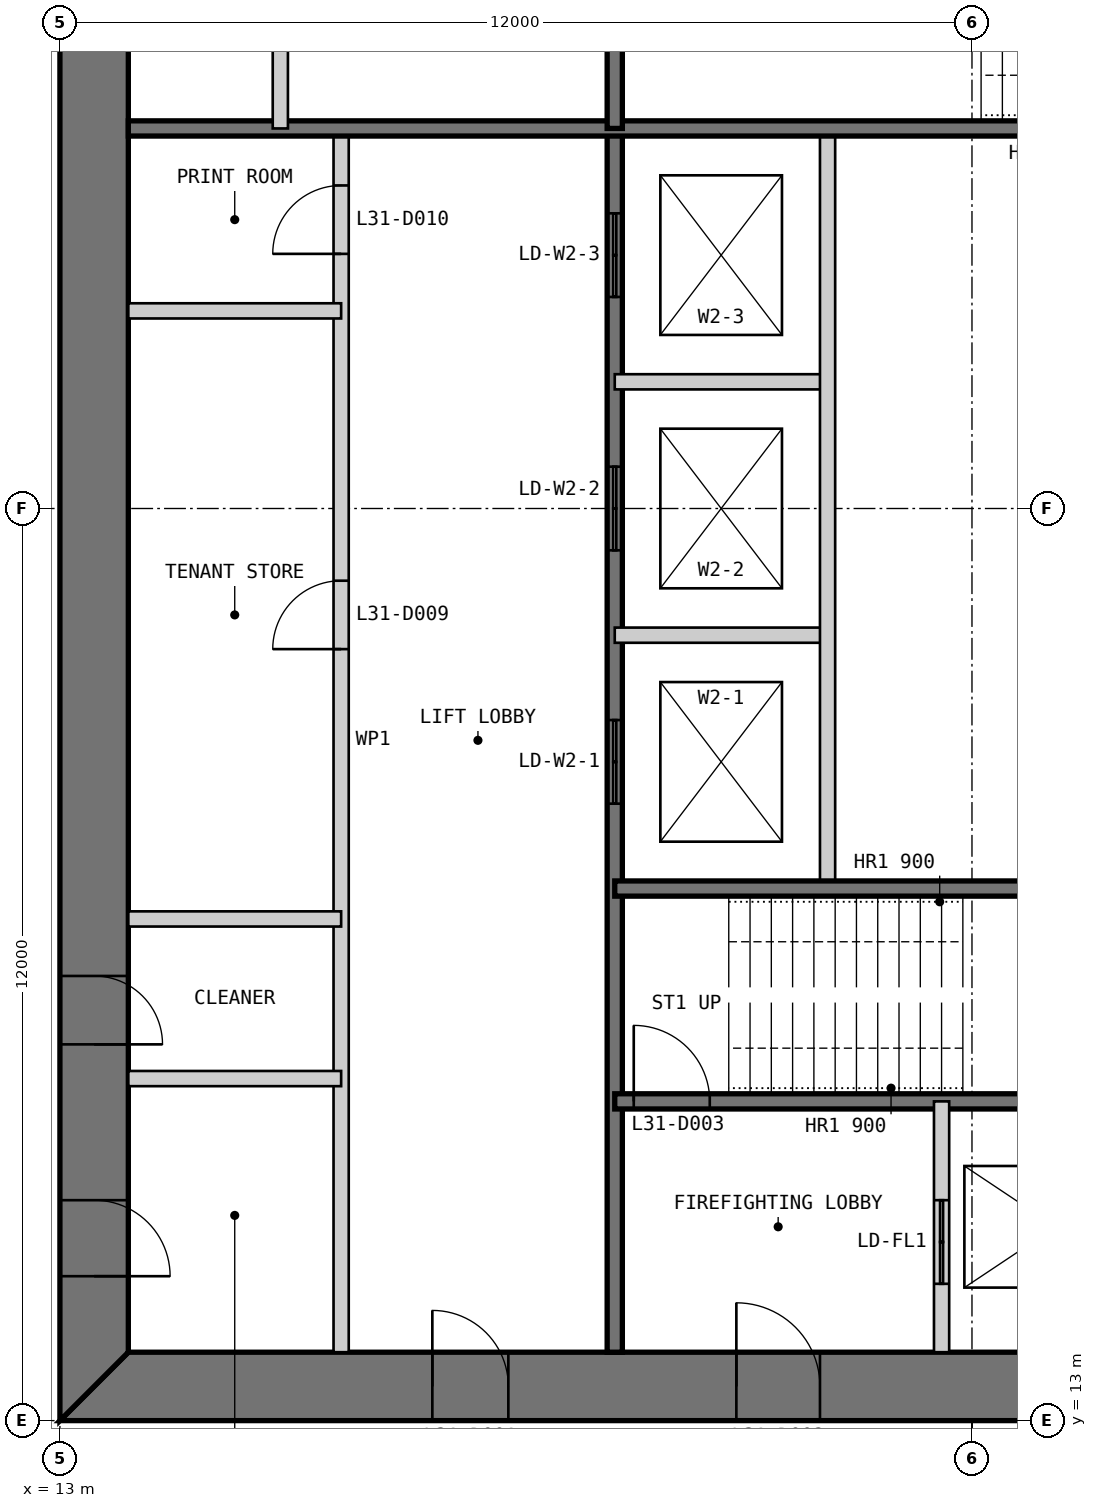
"""IFC4 building model, lengths in metres.
Left out: names, types, materials, properties, quantities, classifications, styles, units other than length and angle.
Written with IfcOpenShell. Run it as: python <this file> out.ifc"""

import sys

from ifc_helpers import new_model, si_unit, direction, frame, frame_2d, origin, place, context, subcontext, project, spatial, polyline, rectangle, outline, extrude, element, fill, save


model = new_model("IFC4")
c1 = context("Model", 3, precision=1e-05, world=origin(), true_north=direction((0.0, 1.0)))
c2 = subcontext(c1, "Body", "Model", "MODEL_VIEW")
j1 = project(units=[si_unit("LENGTHUNIT", "METRE"), si_unit("PLANEANGLEUNIT", "RADIAN")], contexts=[c1])
p1 = place(None, origin())
s1 = spatial("IfcSite", under=j1, at=p1, CompositionType="ELEMENT")
p2 = place(p1, origin())
s2 = spatial("IfcBuilding", under=s1, at=p2, CompositionType="ELEMENT")
p3 = place(p2, frame((0.0, 0.0, 134.4)))
s3 = spatial("IfcBuildingStorey", under=s2, at=p3, CompositionType="ELEMENT", Elevation=134.4)
p4 = place(p3, frame((13.0, 13.45, 0.0), z_axis=(0.0, 0.0, 1.0), x_axis=(1.0, 0.0, 0.0)))
e1 = element("IfcWall", 1, at=p4, inside=s3, PredefinedType="SHEAR", context=c2, shape_type="SweptSolid", body=[
    extrude(outline(polyline([(0.0, -0.45), (24.0, -0.45), (23.1, 0.45), (0.9, 0.45), (0.0, -0.45)])), origin(), (0.0, 0.0, 1.0), 4.0),
])
p5 = place(p4, frame((4.9, 0.0, 0.0)))
e2 = element("IfcOpeningElement", 2, at=p5, cuts=e1, PredefinedType="OPENING", context=c2, shape_type="SweptSolid", body=[
    extrude(rectangle(XDim=1.0, YDim=2.2, at=frame_2d((0.5, 1.1))), frame((0.0, 0.46, 0.0), z_axis=(0.0, -1.0, 0.0), x_axis=(1.0, 0.0, 0.0)), (0.0, 0.0, 1.0), 0.92),
])
p6 = place(p4, frame((8.9, 0.0, 0.0)))
e3 = element("IfcOpeningElement", 3, at=p6, cuts=e1, PredefinedType="OPENING", context=c2, shape_type="SweptSolid", body=[
    extrude(rectangle(XDim=1.1, YDim=2.2, at=frame_2d((0.55, 1.1))), frame((0.0, 0.46, 0.0), z_axis=(0.0, -1.0, 0.0), x_axis=(1.0, 0.0, 0.0)), (0.0, 0.0, 1.0), 0.92),
])
p7 = place(p4, frame((15.05, 0.0, 0.0)))
e4 = element("IfcOpeningElement", 4, at=p7, cuts=e1, PredefinedType="OPENING", context=c2, shape_type="SweptSolid", body=[
    extrude(rectangle(XDim=0.9, YDim=2.2, at=frame_2d((0.45, 1.1))), frame((0.0, 0.46, 0.0), z_axis=(0.0, -1.0, 0.0), x_axis=(1.0, 0.0, 0.0)), (0.0, 0.0, 1.0), 0.92),
])
p8 = place(p4, frame((17.9, 0.0, 0.0)))
e5 = element("IfcOpeningElement", 5, at=p8, cuts=e1, PredefinedType="OPENING", context=c2, shape_type="SweptSolid", body=[
    extrude(rectangle(XDim=1.0, YDim=2.2, at=frame_2d((0.5, 1.1))), frame((0.0, 0.46, 0.0), z_axis=(0.0, -1.0, 0.0), x_axis=(1.0, 0.0, 0.0)), (0.0, 0.0, 1.0), 0.92),
])
p9 = place(p4, frame((21.4, 0.0, 0.0)))
e6 = element("IfcOpeningElement", 6, at=p9, cuts=e1, PredefinedType="OPENING", context=c2, shape_type="SweptSolid", body=[
    extrude(rectangle(XDim=1.0, YDim=2.2, at=frame_2d((0.5, 1.1))), frame((0.0, 0.46, 0.0), z_axis=(0.0, -1.0, 0.0), x_axis=(1.0, 0.0, 0.0)), (0.0, 0.0, 1.0), 0.92),
])
p10 = place(p3, frame((13.45, 36.1, 0.0), z_axis=(0.0, 0.0, 1.0), x_axis=(0.0, -1.0, 0.0)))
e7 = element("IfcWall", 7, at=p10, inside=s3, PredefinedType="SHEAR", context=c2, shape_type="SweptSolid", body=[
    extrude(outline(polyline([(-0.9, -0.45), (23.1, -0.45), (22.2, 0.45), (0.0, 0.45), (-0.9, -0.45)])), origin(), (0.0, 0.0, 1.0), 4.0),
])
p11 = place(p10, frame((20.2, 0.0, 0.0)))
e8 = element("IfcOpeningElement", 8, at=p11, cuts=e7, PredefinedType="OPENING", context=c2, shape_type="SweptSolid", body=[
    extrude(rectangle(XDim=1.0, YDim=2.2, at=frame_2d((0.5, 1.1))), frame((0.0, 0.46, 0.0), z_axis=(0.0, -1.0, 0.0), x_axis=(1.0, 0.0, 0.0)), (0.0, 0.0, 1.0), 0.92),
])
p12 = place(p10, frame((17.25, 0.0, 0.0)))
e9 = element("IfcOpeningElement", 9, at=p12, cuts=e7, PredefinedType="OPENING", context=c2, shape_type="SweptSolid", body=[
    extrude(rectangle(XDim=0.9, YDim=2.2, at=frame_2d((0.45, 1.1))), frame((0.0, 0.46, 0.0), z_axis=(0.0, -1.0, 0.0), x_axis=(1.0, 0.0, 0.0)), (0.0, 0.0, 1.0), 0.92),
])
p13 = place(p3, frame((16.7, 13.9, 0.0), z_axis=(0.0, 0.0, 1.0), x_axis=(0.0, 1.0, 0.0)))
e10 = element("IfcWall", 10, at=p13, inside=s3, PredefinedType="PARTITIONING", context=c2, shape_type="SweptSolid", body=[
    extrude(rectangle(XDim=16.1, YDim=0.2, at=frame_2d((8.05, 0.0))), origin(), (0.0, 0.0, 1.0), 3.8),
])
p14 = place(p13, frame((9.25, 0.0, 0.0)))
e11 = element("IfcOpeningElement", 11, at=p14, cuts=e10, PredefinedType="OPENING", context=c2, shape_type="SweptSolid", body=[
    extrude(rectangle(XDim=0.9, YDim=2.2, at=frame_2d((0.45, 1.1))), frame((0.0, 0.11, 0.0), z_axis=(0.0, -1.0, 0.0), x_axis=(1.0, 0.0, 0.0)), (0.0, 0.0, 1.0), 0.22),
])
p15 = place(p13, frame((14.45, 0.0, 0.0)))
e12 = element("IfcOpeningElement", 12, at=p15, cuts=e10, PredefinedType="OPENING", context=c2, shape_type="SweptSolid", body=[
    extrude(rectangle(XDim=0.9, YDim=2.2, at=frame_2d((0.45, 1.1))), frame((0.0, 0.11, 0.0), z_axis=(0.0, -1.0, 0.0), x_axis=(1.0, 0.0, 0.0)), (0.0, 0.0, 1.0), 0.22),
])
p16 = place(p3, frame((20.3, 13.9, 0.0), z_axis=(0.0, 0.0, 1.0), x_axis=(0.0, 1.0, 0.0)))
e13 = element("IfcWall", 13, at=p16, inside=s3, PredefinedType="SOLIDWALL", context=c2, shape_type="SweptSolid", body=[
    extrude(rectangle(XDim=16.1, YDim=0.2, at=frame_2d((8.05, 0.0))), origin(), (0.0, 0.0, 1.0), 3.8),
])
p17 = place(p16, frame((7.217, 0.0, 0.0)))
e14 = element("IfcOpeningElement", 14, at=p17, cuts=e13, PredefinedType="OPENING", context=c2, shape_type="SweptSolid", body=[
    extrude(rectangle(XDim=1.1, YDim=2.2, at=frame_2d((0.55, 1.1))), frame((0.0, 0.11, 0.0), z_axis=(0.0, -1.0, 0.0), x_axis=(1.0, 0.0, 0.0)), (0.0, 0.0, 1.0), 0.22),
])
p18 = place(p16, frame((10.55, 0.0, 0.0)))
e15 = element("IfcOpeningElement", 15, at=p18, cuts=e13, PredefinedType="OPENING", context=c2, shape_type="SweptSolid", body=[
    extrude(rectangle(XDim=1.1, YDim=2.2, at=frame_2d((0.55, 1.1))), frame((0.0, 0.11, 0.0), z_axis=(0.0, -1.0, 0.0), x_axis=(1.0, 0.0, 0.0)), (0.0, 0.0, 1.0), 0.22),
])
p19 = place(p16, frame((13.883, 0.0, 0.0)))
e16 = element("IfcOpeningElement", 16, at=p19, cuts=e13, PredefinedType="OPENING", context=c2, shape_type="SweptSolid", body=[
    extrude(rectangle(XDim=1.1, YDim=2.2, at=frame_2d((0.55, 1.1))), frame((0.0, 0.11, 0.0), z_axis=(0.0, -1.0, 0.0), x_axis=(1.0, 0.0, 0.0)), (0.0, 0.0, 1.0), 0.22),
])
for number, where, z_axis, x_axis in (
    (17, (20.3, 23.333, 0.0), (0.0, 0.0, 1.0), (1.0, 0.0, 0.0)),
    (18, (20.3, 26.667, 0.0), (0.0, 0.0, 1.0), (1.0, 0.0, 0.0)),
):
    element("IfcWall", number, at=place(p3, frame(where, z_axis=z_axis, x_axis=x_axis)), inside=s3, PredefinedType="PARTITIONING", context=c2, shape_type="SweptSolid", body=[
        extrude(rectangle(XDim=2.8, YDim=0.2, at=frame_2d((1.4, 0.0))), origin(), (0.0, 0.0, 1.0), 3.8),
    ])
p20 = place(p3, frame((23.1, 20.0, 0.0), z_axis=(0.0, 0.0, 1.0), x_axis=(0.0, 1.0, 0.0)))
e19 = element("IfcWall", 19, at=p20, inside=s3, PredefinedType="PARTITIONING", context=c2, shape_type="SweptSolid", body=[
    extrude(rectangle(XDim=10.0, YDim=0.2, at=frame_2d((5.0, 0.0))), origin(), (0.0, 0.0, 1.0), 3.8),
])
p21 = place(p3, frame((20.3, 17.2, 0.0), z_axis=(0.0, 0.0, 1.0), x_axis=(1.0, 0.0, 0.0)))
e20 = element("IfcWall", 20, at=p21, inside=s3, PredefinedType="SOLIDWALL", context=c2, shape_type="SweptSolid", body=[
    extrude(rectangle(XDim=9.4, YDim=0.2, at=frame_2d((4.7, 0.0))), origin(), (0.0, 0.0, 1.0), 3.8),
])
p22 = place(p21, frame((0.25, 0.0, 0.0)))
e21 = element("IfcOpeningElement", 21, at=p22, cuts=e20, PredefinedType="OPENING", context=c2, shape_type="SweptSolid", body=[
    extrude(rectangle(XDim=1.0, YDim=2.2, at=frame_2d((0.5, 1.1))), frame((0.0, 0.11, 0.0), z_axis=(0.0, -1.0, 0.0), x_axis=(1.0, 0.0, 0.0)), (0.0, 0.0, 1.0), 0.22),
])
p23 = place(p3, frame((20.3, 20.0, 0.0), z_axis=(0.0, 0.0, 1.0), x_axis=(1.0, 0.0, 0.0)))
e22 = element("IfcWall", 22, at=p23, inside=s3, PredefinedType="SOLIDWALL", context=c2, shape_type="SweptSolid", body=[
    extrude(rectangle(XDim=15.8, YDim=0.2, at=frame_2d((7.9, 0.0))), origin(), (0.0, 0.0, 1.0), 3.8),
])
p24 = place(p3, frame((24.6, 13.9, 0.0), z_axis=(0.0, 0.0, 1.0), x_axis=(0.0, 1.0, 0.0)))
e23 = element("IfcWall", 23, at=p24, inside=s3, PredefinedType="PARTITIONING", context=c2, shape_type="SweptSolid", body=[
    extrude(rectangle(XDim=3.3, YDim=0.2, at=frame_2d((1.65, 0.0))), origin(), (0.0, 0.0, 1.0), 3.8),
])
p25 = place(p24, frame((0.9, 0.0, 0.0)))
e24 = element("IfcOpeningElement", 24, at=p25, cuts=e23, PredefinedType="OPENING", context=c2, shape_type="SweptSolid", body=[
    extrude(rectangle(XDim=1.1, YDim=2.2, at=frame_2d((0.55, 1.1))), frame((0.0, 0.11, 0.0), z_axis=(0.0, -1.0, 0.0), x_axis=(1.0, 0.0, 0.0)), (0.0, 0.0, 1.0), 0.22),
])
for number, where, z_axis, x_axis in (
    (25, (13.9, 17.5, 0.0), (0.0, 0.0, 1.0), (1.0, 0.0, 0.0)),
    (26, (13.9, 19.6, 0.0), (0.0, 0.0, 1.0), (1.0, 0.0, 0.0)),
    (27, (13.9, 27.6, 0.0), (0.0, 0.0, 1.0), (1.0, 0.0, 0.0)),
):
    element("IfcWall", number, at=place(p3, frame(where, z_axis=z_axis, x_axis=x_axis)), inside=s3, PredefinedType="PARTITIONING", context=c2, shape_type="SweptSolid", body=[
        extrude(rectangle(XDim=2.8, YDim=0.2, at=frame_2d((1.4, 0.0))), origin(), (0.0, 0.0, 1.0), 3.8),
    ])
p26 = place(p3, frame((29.7, 30.0, 0.0), z_axis=(0.0, 0.0, 1.0), x_axis=(-1.0, 0.0, 0.0)))
e28 = element("IfcWall", 28, at=p26, inside=s3, PredefinedType="SOLIDWALL", context=c2, shape_type="SweptSolid", body=[
    extrude(rectangle(XDim=15.8, YDim=0.2, at=frame_2d((7.9, 0.0))), origin(), (0.0, 0.0, 1.0), 3.8),
])
p27 = place(p3, frame((20.3, 36.1, 0.0), z_axis=(0.0, 0.0, 1.0), x_axis=(0.0, -1.0, 0.0)))
e29 = element("IfcWall", 29, at=p27, inside=s3, PredefinedType="SOLIDWALL", context=c2, shape_type="SweptSolid", body=[
    extrude(rectangle(XDim=6.1, YDim=0.2, at=frame_2d((3.05, 0.0))), origin(), (0.0, 0.0, 1.0), 3.8),
])
p28 = place(p3, frame((15.9, 36.1, 0.0), z_axis=(0.0, 0.0, 1.0), x_axis=(0.0, -1.0, 0.0)))
e30 = element("IfcWall", 30, at=p28, inside=s3, PredefinedType="PARTITIONING", context=c2, shape_type="SweptSolid", body=[
    extrude(rectangle(XDim=6.1, YDim=0.2, at=frame_2d((3.05, 0.0))), origin(), (0.0, 0.0, 1.0), 3.8),
])
p29 = place(p5, origin())
e31 = element("IfcDoor", 31, at=p29, inside=s3, OperationType="SINGLE_SWING_LEFT", PredefinedType="DOOR", context=c2, shape_type="SweptSolid", body=[
    extrude(rectangle(XDim=1.0, YDim=2.2, at=frame_2d((0.5, 1.1))), frame((0.0, 0.025, 0.0), z_axis=(0.0, -1.0, 0.0), x_axis=(1.0, 0.0, 0.0)), (0.0, 0.0, 1.0), 0.05),
    extrude(outline(polyline([(0.0, 0.0), (0.04, 0.0), (0.04, 2.16), (0.96, 2.16), (0.96, 0.0), (1.0, 0.0), (1.0, 2.2), (0.0, 2.2), (0.0, 0.0)])), frame((0.0, 0.3, 0.0), z_axis=(0.0, -1.0, 0.0), x_axis=(1.0, 0.0, 0.0)), (0.0, 0.0, 1.0), 0.6),
])
fill(e2, e31)
p30 = place(p6, origin())
e32 = element("IfcDoor", 32, at=p30, inside=s3, OperationType="SINGLE_SWING_LEFT", PredefinedType="DOOR", context=c2, shape_type="SweptSolid", body=[
    extrude(rectangle(XDim=1.1, YDim=2.2, at=frame_2d((0.55, 1.1))), frame((0.0, 0.025, 0.0), z_axis=(0.0, -1.0, 0.0), x_axis=(1.0, 0.0, 0.0)), (0.0, 0.0, 1.0), 0.05),
    extrude(outline(polyline([(0.0, 0.0), (0.04, 0.0), (0.04, 2.16), (1.06, 2.16), (1.06, 0.0), (1.1, 0.0), (1.1, 2.2), (0.0, 2.2), (0.0, 0.0)])), frame((0.0, 0.3, 0.0), z_axis=(0.0, -1.0, 0.0), x_axis=(1.0, 0.0, 0.0)), (0.0, 0.0, 1.0), 0.6),
])
fill(e3, e32)
p31 = place(p22, origin())
e33 = element("IfcDoor", 33, at=p31, inside=s3, OperationType="SINGLE_SWING_LEFT", PredefinedType="DOOR", context=c2, shape_type="SweptSolid", body=[
    extrude(rectangle(XDim=1.0, YDim=2.2, at=frame_2d((0.5, 1.1))), frame((0.0, 0.025, 0.0), z_axis=(0.0, -1.0, 0.0), x_axis=(1.0, 0.0, 0.0)), (0.0, 0.0, 1.0), 0.05),
])
fill(e21, e33)
p32 = place(p11, origin())
e34 = element("IfcDoor", 34, at=p32, inside=s3, OperationType="SINGLE_SWING_RIGHT", PredefinedType="DOOR", context=c2, shape_type="SweptSolid", body=[
    extrude(rectangle(XDim=1.0, YDim=2.2, at=frame_2d((0.5, 1.1))), frame((0.0, 0.025, 0.0), z_axis=(0.0, -1.0, 0.0), x_axis=(1.0, 0.0, 0.0)), (0.0, 0.0, 1.0), 0.05),
    extrude(outline(polyline([(0.0, 0.0), (0.04, 0.0), (0.04, 2.16), (0.96, 2.16), (0.96, 0.0), (1.0, 0.0), (1.0, 2.2), (0.0, 2.2), (0.0, 0.0)])), frame((0.0, 0.3, 0.0), z_axis=(0.0, -1.0, 0.0), x_axis=(1.0, 0.0, 0.0)), (0.0, 0.0, 1.0), 0.6),
])
fill(e8, e34)
p33 = place(p12, origin())
e35 = element("IfcDoor", 35, at=p33, inside=s3, OperationType="SINGLE_SWING_RIGHT", PredefinedType="DOOR", context=c2, shape_type="SweptSolid", body=[
    extrude(rectangle(XDim=0.9, YDim=2.2, at=frame_2d((0.45, 1.1))), frame((0.0, 0.025, 0.0), z_axis=(0.0, -1.0, 0.0), x_axis=(1.0, 0.0, 0.0)), (0.0, 0.0, 1.0), 0.05),
    extrude(outline(polyline([(0.0, 0.0), (0.04, 0.0), (0.04, 2.16), (0.86, 2.16), (0.86, 0.0), (0.9, 0.0), (0.9, 2.2), (0.0, 2.2), (0.0, 0.0)])), frame((0.0, 0.3, 0.0), z_axis=(0.0, -1.0, 0.0), x_axis=(1.0, 0.0, 0.0)), (0.0, 0.0, 1.0), 0.6),
])
fill(e9, e35)
p34 = place(p14, origin())
e36 = element("IfcDoor", 36, at=p34, inside=s3, OperationType="SINGLE_SWING_LEFT", PredefinedType="DOOR", context=c2, shape_type="SweptSolid", body=[
    extrude(rectangle(XDim=0.9, YDim=2.2, at=frame_2d((0.45, 1.1))), frame((0.0, 0.025, 0.0), z_axis=(0.0, -1.0, 0.0), x_axis=(1.0, 0.0, 0.0)), (0.0, 0.0, 1.0), 0.05),
])
fill(e11, e36)
p35 = place(p15, origin())
e37 = element("IfcDoor", 37, at=p35, inside=s3, OperationType="SINGLE_SWING_LEFT", PredefinedType="DOOR", context=c2, shape_type="SweptSolid", body=[
    extrude(rectangle(XDim=0.9, YDim=2.2, at=frame_2d((0.45, 1.1))), frame((0.0, 0.025, 0.0), z_axis=(0.0, -1.0, 0.0), x_axis=(1.0, 0.0, 0.0)), (0.0, 0.0, 1.0), 0.05),
])
fill(e12, e37)
p36 = place(p25, origin())
e38 = element("IfcDoor", 38, at=p36, inside=s3, OperationType="DOUBLE_DOOR_SLIDING", PredefinedType="DOOR", context=c2, shape_type="SweptSolid", body=[
    extrude(rectangle(XDim=1.1, YDim=2.2, at=frame_2d((0.55, 1.1))), frame((0.0, 0.025, 0.0), z_axis=(0.0, -1.0, 0.0), x_axis=(1.0, 0.0, 0.0)), (0.0, 0.0, 1.0), 0.05),
])
fill(e24, e38)
p37 = place(p17, origin())
e39 = element("IfcDoor", 39, at=p37, inside=s3, OperationType="DOUBLE_DOOR_SLIDING", PredefinedType="DOOR", context=c2, shape_type="SweptSolid", body=[
    extrude(rectangle(XDim=1.1, YDim=2.2, at=frame_2d((0.55, 1.1))), frame((0.0, 0.025, 0.0), z_axis=(0.0, -1.0, 0.0), x_axis=(1.0, 0.0, 0.0)), (0.0, 0.0, 1.0), 0.05),
])
fill(e14, e39)
p38 = place(p18, origin())
e40 = element("IfcDoor", 40, at=p38, inside=s3, OperationType="DOUBLE_DOOR_SLIDING", PredefinedType="DOOR", context=c2, shape_type="SweptSolid", body=[
    extrude(rectangle(XDim=1.1, YDim=2.2, at=frame_2d((0.55, 1.1))), frame((0.0, 0.025, 0.0), z_axis=(0.0, -1.0, 0.0), x_axis=(1.0, 0.0, 0.0)), (0.0, 0.0, 1.0), 0.05),
])
fill(e15, e40)
p39 = place(p19, origin())
e41 = element("IfcDoor", 41, at=p39, inside=s3, OperationType="DOUBLE_DOOR_SLIDING", PredefinedType="DOOR", context=c2, shape_type="SweptSolid", body=[
    extrude(rectangle(XDim=1.1, YDim=2.2, at=frame_2d((0.55, 1.1))), frame((0.0, 0.025, 0.0), z_axis=(0.0, -1.0, 0.0), x_axis=(1.0, 0.0, 0.0)), (0.0, 0.0, 1.0), 0.05),
])
fill(e16, e41)
save(model, sys.argv[1])
